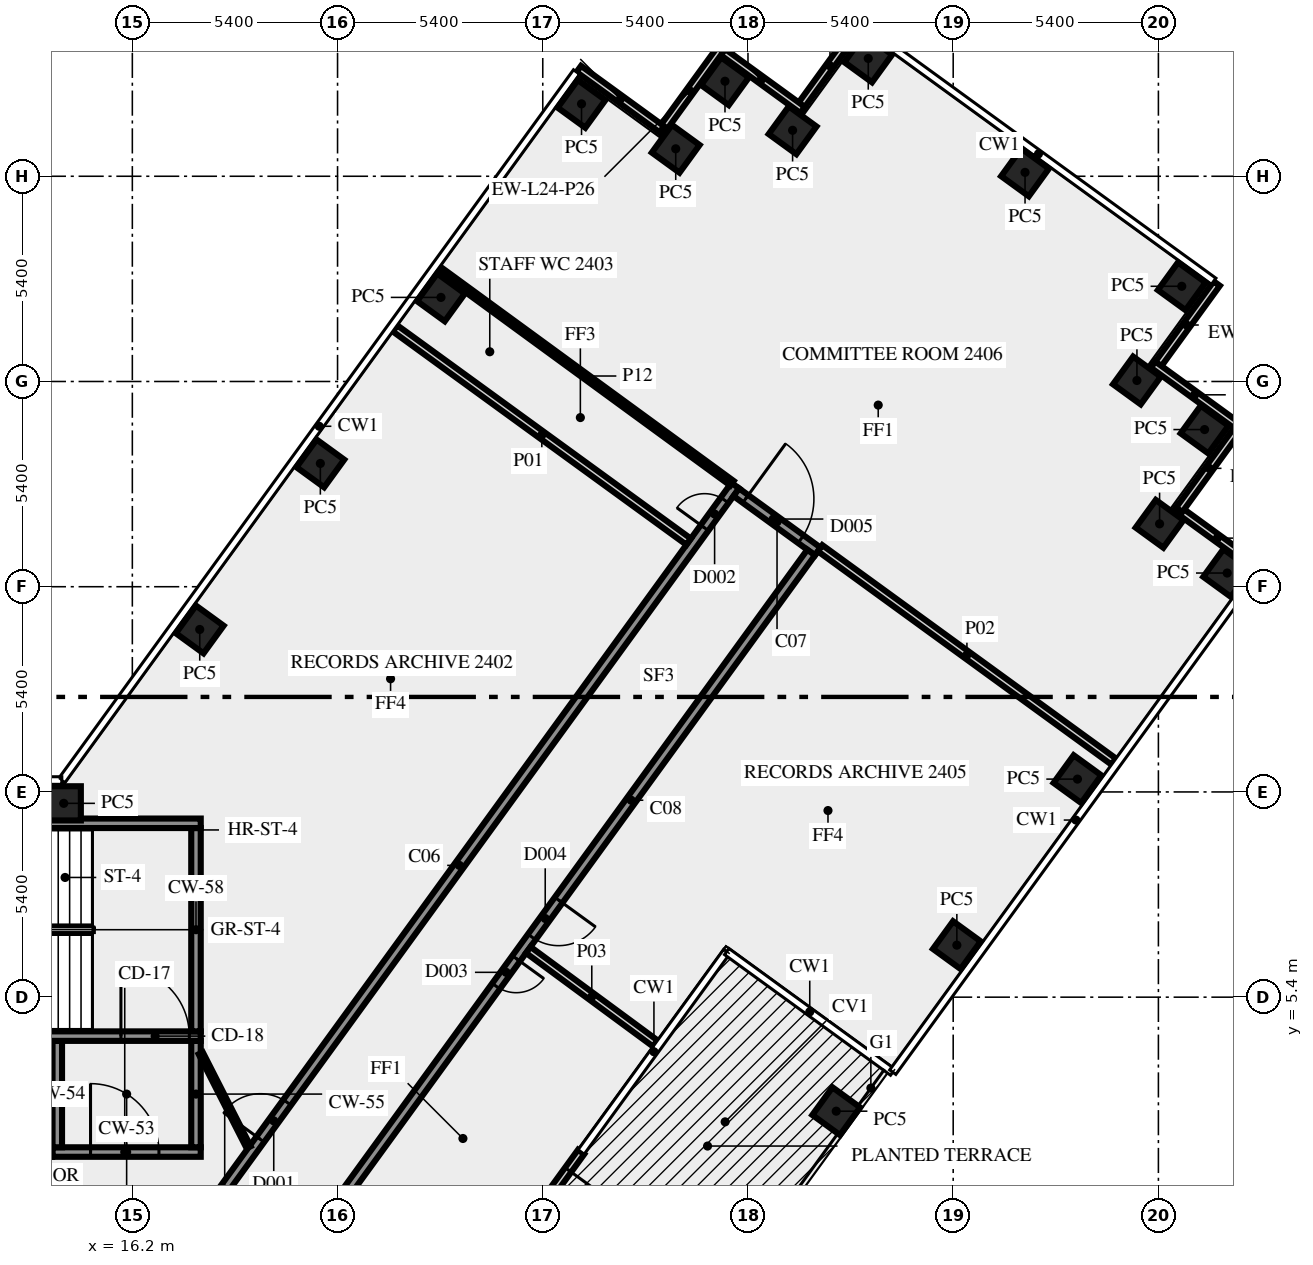
"""IFC4 building model, lengths in metres.
Left out: names, types, materials, properties, quantities, classifications, styles, units other than length and angle.
Written with IfcOpenShell. Run it as: python <this file> out.ifc"""

import sys

from ifc_helpers import new_model, si_unit, direction, frame, frame_2d, origin, origin_2d, place, context, subcontext, project, spatial, rectangle, extrude, element, fill, save


model = new_model("IFC4")
c1 = context("Model", 3, precision=1e-05, world=origin(), true_north=direction((0.0, 1.0)))
c2 = subcontext(c1, "Body", "Model", "MODEL_VIEW")
j1 = project(units=[si_unit("LENGTHUNIT", "METRE"), si_unit("PLANEANGLEUNIT", "RADIAN")], contexts=[c1])
p1 = place(None, origin())
s1 = spatial("IfcSite", under=j1, at=p1, CompositionType="ELEMENT")
p2 = place(p1, origin())
s2 = spatial("IfcBuilding", under=s1, at=p2, CompositionType="ELEMENT")
p3 = place(p2, frame((0.0, 0.0, 105.0)))
s3 = spatial("IfcBuildingStorey", under=s2, at=p3, CompositionType="ELEMENT", Elevation=105.0)
for number, where, z_axis, x_axis in (
    (1, (34.722, 2.4, 0.0), (0.0, 0.0, 1.0), (0.588, 0.809, 0.0)),
    (2, (37.896, 6.769, 0.0), (0.0, 0.0, 1.0), (0.588, 0.809, 0.0)),
    (3, (41.07, 11.137, 0.0), (0.0, 0.0, 1.0), (0.588, 0.809, 0.0)),
    (4, (45.01, 16.56, 0.0), (0.0, 0.0, 1.0), (0.588, 0.809, 0.0)),
    (5, (43.231, 17.854, 0.0), (0.0, 0.0, 1.0), (0.588, 0.809, 0.0)),
    (6, (44.415, 20.335, 0.0), (0.0, 0.0, 1.0), (0.588, 0.809, 0.0)),
    (7, (42.635, 21.626, 0.0), (0.0, 0.0, 1.0), (-0.809, 0.588, 0.0)),
    (8, (43.815, 24.105, 0.0), (0.0, 0.0, 1.0), (-0.809, 0.588, 0.0)),
    (9, (39.691, 27.102, 0.0), (0.0, 0.0, 1.0), (-0.809, 0.588, 0.0)),
    (10, (35.565, 30.1, 0.0), (0.0, 0.0, 1.0), (-0.588, -0.809, 0.0)),
    (11, (33.574, 28.209, 0.0), (0.0, 0.0, 1.0), (-0.809, 0.588, 0.0)),
    (12, (31.795, 29.5, 0.0), (0.0, 0.0, 1.0), (-0.588, -0.809, 0.0)),
    (13, (30.499, 27.723, 0.0), (0.0, 0.0, 1.0), (-0.809, 0.588, 0.0)),
    (14, (28.02, 28.905, 0.0), (0.0, 0.0, 1.0), (-0.809, 0.588, 0.0)),
    (15, (24.321, 23.812, 0.0), (0.0, 0.0, 1.0), (-0.588, -0.809, 0.0)),
    (16, (21.147, 19.444, 0.0), (0.0, 0.0, 1.0), (-0.588, -0.809, 0.0)),
    (17, (17.974, 15.075, 0.0), (0.0, 0.0, 1.0), (-0.588, -0.809, 0.0)),
    (18, (14.395, 10.5, 0.0), (0.0, 0.0, 1.0), (-1.0, 0.0, 0.0)),
):
    element("IfcColumn", number, at=place(p3, frame(where, z_axis=z_axis, x_axis=x_axis)), inside=s3, PredefinedType="COLUMN", context=c2, shape_type="SweptSolid", body=[
        extrude(rectangle(XDim=0.9, YDim=0.9, at=origin_2d()), origin(), (0.0, 0.0, 1.0), 3.65),
    ])
for number, where, z_axis, x_axis in (
    (19, (43.149, 21.994, 0.0), (0.0, 0.0, 1.0), (0.588, 0.809, 0.0)),
    (20, (35.351, 30.997, 0.0), (0.0, 0.0, 1.0), (-0.588, -0.809, 0.0)),
    (21, (33.838, 28.744, 0.0), (0.0, 0.0, 1.0), (-0.809, 0.588, 0.0)),
    (22, (31.67, 30.333, 0.0), (0.0, 0.0, 1.0), (-0.588, -0.809, 0.0)),
    (23, (30.133, 28.237, 0.0), (0.0, 0.0, 1.0), (-0.809, 0.588, 0.0)),
):
    element("IfcWall", number, at=place(p3, frame(where, z_axis=z_axis, x_axis=x_axis)), inside=s3, PredefinedType="SOLIDWALL", context=c2, shape_type="SweptSolid", body=[
        extrude(rectangle(XDim=2.7, YDim=0.2, at=frame_2d((1.35, 0.0))), origin(), (0.0, 0.0, 1.0), 3.65),
    ])
p4 = place(p3, frame((28.01, 1.327, 0.0), z_axis=(0.0, 0.0, 1.0), x_axis=(-0.587735577821, -0.809053082661, 0.0)))
e24 = element("IfcWall", 24, at=p4, inside=s3, PredefinedType="SOLIDWALL", context=c2, shape_type="SweptSolid", body=[
    extrude(rectangle(XDim=2.963, YDim=0.2, at=frame_2d((1.481, 0.0))), origin(), (0.0, 0.0, 1.0), 3.65),
])
p5 = place(p4, frame((0.582, 0.0, 0.0)))
e25 = element("IfcOpeningElement", 25, at=p5, cuts=e24, PredefinedType="OPENING", context=c2, shape_type="SweptSolid", body=[
    extrude(rectangle(XDim=1.8, YDim=2.4, at=frame_2d((0.9, 1.2))), frame((0.0, 0.11, 0.0), z_axis=(0.0, -1.0, 0.0), x_axis=(1.0, 0.0, 0.0)), (0.0, 0.0, 1.0), 0.22),
])
for number, where, z_axis, x_axis in (
    (26, (45.842, 16.685, 0.0), (0.0, 0.0, 1.0), (-0.809, 0.588, 0.0)),
    (27, (43.746, 18.223, 0.0), (0.0, 0.0, 1.0), (0.588, 0.809, 0.0)),
    (28, (45.245, 20.456, 0.0), (0.0, 0.0, 1.0), (-0.809, 0.588, 0.0)),
):
    element("IfcWall", number, at=place(p3, frame(where, z_axis=z_axis, x_axis=x_axis)), inside=s3, PredefinedType="SOLIDWALL", context=c2, shape_type="SweptSolid", body=[
        extrude(rectangle(XDim=2.7, YDim=0.2, at=frame_2d((1.35, 0.0))), origin(), (0.0, 0.0, 1.0), 3.65),
    ])
p6 = place(p3, frame((14.1, 1.325, 0.0), z_axis=(0.0, 0.0, 1.0), x_axis=(1.0, 0.0, 0.0)))
e29 = element("IfcWall", 29, at=p6, inside=s3, PredefinedType="SHEAR", context=c2, shape_type="SweptSolid", body=[
    extrude(rectangle(XDim=3.9, YDim=0.25, at=frame_2d((1.95, 0.0))), origin(), (0.0, 0.0, 1.0), 3.65),
])
p7 = place(p6, frame((1.0, 0.0, 0.0)))
e30 = element("IfcOpeningElement", 30, at=p7, cuts=e29, PredefinedType="OPENING", context=c2, shape_type="SweptSolid", body=[
    extrude(rectangle(XDim=1.8, YDim=2.1, at=frame_2d((0.9, 1.05))), frame((0.0, 0.135, 0.0), z_axis=(0.0, -1.0, 0.0), x_axis=(1.0, 0.0, 0.0)), (0.0, 0.0, 1.0), 0.27),
])
for number, where, z_axis, x_axis in (
    (31, (14.225, 1.45, 0.0), (0.0, 0.0, 1.0), (0.0, 1.0, 0.0)),
    (32, (17.875, 1.45, 0.0), (0.0, 0.0, 1.0), (0.0, 1.0, 0.0)),
):
    element("IfcWall", number, at=place(p3, frame(where, z_axis=z_axis, x_axis=x_axis)), inside=s3, PredefinedType="SHEAR", context=c2, shape_type="SweptSolid", body=[
        extrude(rectangle(XDim=2.8, YDim=0.25, at=frame_2d((1.4, 0.0))), origin(), (0.0, 0.0, 1.0), 3.65),
    ])
p8 = place(p3, frame((7.5, 4.375, 0.0), z_axis=(0.0, 0.0, 1.0), x_axis=(1.0, 0.0, 0.0)))
e33 = element("IfcWall", 33, at=p8, inside=s3, PredefinedType="SHEAR", context=c2, shape_type="SweptSolid", body=[
    extrude(rectangle(XDim=10.5, YDim=0.25, at=frame_2d((5.25, 0.0))), origin(), (0.0, 0.0, 1.0), 3.65),
])
p9 = place(p8, frame((8.4, 0.0, 0.0)))
e34 = element("IfcOpeningElement", 34, at=p9, cuts=e33, PredefinedType="OPENING", context=c2, shape_type="SweptSolid", body=[
    extrude(rectangle(XDim=1.8, YDim=2.1, at=frame_2d((0.9, 1.05))), frame((0.0, 0.135, 0.0), z_axis=(0.0, -1.0, 0.0), x_axis=(1.0, 0.0, 0.0)), (0.0, 0.0, 1.0), 0.27),
])
p10 = place(p3, frame((17.875, 4.5, 0.0), z_axis=(0.0, 0.0, 1.0), x_axis=(0.0, 1.0, 0.0)))
e35 = element("IfcWall", 35, at=p10, inside=s3, PredefinedType="SHEAR", context=c2, shape_type="SweptSolid", body=[
    extrude(rectangle(XDim=5.35, YDim=0.25, at=frame_2d((2.675, 0.0))), origin(), (0.0, 0.0, 1.0), 3.65),
])
p11 = place(p3, frame((7.5, 9.975, 0.0), z_axis=(0.0, 0.0, 1.0), x_axis=(1.0, 0.0, 0.0)))
e36 = element("IfcWall", 36, at=p11, inside=s3, PredefinedType="SHEAR", context=c2, shape_type="SweptSolid", body=[
    extrude(rectangle(XDim=10.5, YDim=0.25, at=frame_2d((5.25, 0.0))), origin(), (0.0, 0.0, 1.0), 3.65),
])
p12 = place(p11, frame((2.0, 0.0, 1.0)))
e37 = element("IfcOpeningElement", 37, at=p12, cuts=e36, PredefinedType="OPENING", context=c2, shape_type="SweptSolid", body=[
    extrude(rectangle(XDim=1.2, YDim=1.2, at=frame_2d((0.6, 0.6))), frame((0.0, 0.135, 0.0), z_axis=(0.0, -1.0, 0.0), x_axis=(1.0, 0.0, 0.0)), (0.0, 0.0, 1.0), 0.27),
])
p13 = place(p3, frame((17.545, -1.125, 0.0), z_axis=(0.0, 0.0, 1.0), x_axis=(0.587791430994, 0.80901250525, 0.0)))
e38 = element("IfcWall", 38, at=p13, inside=s3, PredefinedType="SOLIDWALL", context=c2, shape_type="SweptSolid", body=[
    extrude(rectangle(XDim=24.703, YDim=0.25, at=frame_2d((12.352, 0.0))), origin(), (0.0, 0.0, 1.0), 3.65),
])
p14 = place(p13, frame((3.442, 0.0, 0.0)))
e39 = element("IfcOpeningElement", 39, at=p14, cuts=e38, PredefinedType="OPENING", context=c2, shape_type="SweptSolid", body=[
    extrude(rectangle(XDim=1.2, YDim=2.1, at=frame_2d((0.6, 1.05))), frame((0.0, 0.135, 0.0), z_axis=(0.0, -1.0, 0.0), x_axis=(1.0, 0.0, 0.0)), (0.0, 0.0, 1.0), 0.27),
])
p15 = place(p13, frame((23.329, 0.0, 0.0)))
e40 = element("IfcOpeningElement", 40, at=p15, cuts=e38, PredefinedType="OPENING", context=c2, shape_type="SweptSolid", body=[
    extrude(rectangle(XDim=0.9, YDim=2.1, at=frame_2d((0.45, 1.05))), frame((0.0, 0.135, 0.0), z_axis=(0.0, -1.0, 0.0), x_axis=(1.0, 0.0, 0.0)), (0.0, 0.0, 1.0), 0.27),
])
p16 = place(p3, frame((32.093, 18.686, 0.0), z_axis=(0.0, 0.0, 1.0), x_axis=(0.809006914995, -0.587799125119, 0.0)))
e41 = element("IfcWall", 41, at=p16, inside=s3, PredefinedType="SOLIDWALL", context=c2, shape_type="SweptSolid", body=[
    extrude(rectangle(XDim=2.65, YDim=0.25, at=frame_2d((1.325, 0.0))), origin(), (0.0, 0.0, 1.0), 3.65),
])
p17 = place(p16, frame((0.3, 0.0, 0.0)))
e42 = element("IfcOpeningElement", 42, at=p17, cuts=e41, PredefinedType="OPENING", context=c2, shape_type="SweptSolid", body=[
    extrude(rectangle(XDim=1.8, YDim=2.1, at=frame_2d((0.9, 1.05))), frame((0.0, 0.135, 0.0), z_axis=(0.0, -1.0, 0.0), x_axis=(1.0, 0.0, 0.0)), (0.0, 0.0, 1.0), 0.27),
])
p18 = place(p3, frame((34.062, 17.101, 0.0), z_axis=(0.0, 0.0, 1.0), x_axis=(-0.58778129431, -0.809019870003, 0.0)))
e43 = element("IfcWall", 43, at=p18, inside=s3, PredefinedType="SOLIDWALL", context=c2, shape_type="SweptSolid", body=[
    extrude(rectangle(XDim=23.021, YDim=0.25, at=frame_2d((11.51, 0.0))), origin(), (0.0, 0.0, 1.0), 3.65),
])
p19 = place(p18, frame((11.304, 0.0, 0.0)))
e44 = element("IfcOpeningElement", 44, at=p19, cuts=e43, PredefinedType="OPENING", context=c2, shape_type="SweptSolid", body=[
    extrude(rectangle(XDim=1.2, YDim=2.1, at=frame_2d((0.6, 1.05))), frame((0.0, 0.135, 0.0), z_axis=(0.0, -1.0, 0.0), x_axis=(1.0, 0.0, 0.0)), (0.0, 0.0, 1.0), 0.27),
])
p20 = place(p18, frame((13.205, 0.0, 0.0)))
e45 = element("IfcOpeningElement", 45, at=p20, cuts=e43, PredefinedType="OPENING", context=c2, shape_type="SweptSolid", body=[
    extrude(rectangle(XDim=0.9, YDim=2.1, at=frame_2d((0.45, 1.05))), frame((0.0, 0.135, 0.0), z_axis=(0.0, -1.0, 0.0), x_axis=(1.0, 0.0, 0.0)), (0.0, 0.0, 1.0), 0.27),
])
p21 = place(p3, frame((30.838, 17.385, 0.0), z_axis=(0.0, 0.0, 1.0), x_axis=(-0.809043311713, 0.587749027879, 0.0)))
e46 = element("IfcWall", 46, at=p21, inside=s3, PredefinedType="SOLIDWALL", context=c2, shape_type="SweptSolid", body=[
    extrude(rectangle(XDim=9.55, YDim=0.2, at=frame_2d((4.775, 0.0))), origin(), (0.0, 0.0, 1.0), 2.75),
])
p22 = place(p3, frame((42.024, 11.599, 0.0), z_axis=(0.0, 0.0, 1.0), x_axis=(-0.80898585166, 0.587828114175, 0.0)))
e47 = element("IfcWall", 47, at=p22, inside=s3, PredefinedType="SOLIDWALL", context=c2, shape_type="SweptSolid", body=[
    extrude(rectangle(XDim=9.55, YDim=0.2, at=frame_2d((4.775, 0.0))), origin(), (0.0, 0.0, 1.0), 2.75),
])
p23 = place(p3, frame((26.619, 6.643, 0.0), z_axis=(0.0, 0.0, 1.0), x_axis=(0.805298264495, -0.592869888931, 0.0)))
e48 = element("IfcWall", 48, at=p23, inside=s3, PredefinedType="SOLIDWALL", context=c2, shape_type="SweptSolid", body=[
    extrude(rectangle(XDim=4.15, YDim=0.2, at=frame_2d((2.075, 0.0))), origin(), (0.0, 0.0, 1.0), 3.65),
])
p24 = place(p3, frame((24.251, 24.566, 0.0), z_axis=(0.0, 0.0, 1.0), x_axis=(0.807588329082, -0.589746632657, 0.0)))
e49 = element("IfcWall", 49, at=p24, inside=s3, PredefinedType="PARTITIONING", context=c2, shape_type="SweptSolid", body=[
    extrude(rectangle(XDim=9.57, YDim=0.15, at=frame_2d((4.785, 0.0))), origin(), (0.0, 0.0, 1.0), 2.75),
])
p25 = place(p3, frame((18.0, 3.925, 0.0), z_axis=(0.0, 0.0, 1.0), x_axis=(0.453950796792, -0.891026752736, 0.0)))
e50 = element("IfcWall", 50, at=p25, inside=s3, PredefinedType="PARTITIONING", context=c2, shape_type="SweptSolid", body=[
    extrude(rectangle(XDim=2.778, YDim=0.12, at=frame_2d((1.389, 0.0))), origin(), (0.0, 0.0, 1.0), 3.65),
])
p26 = place(p5, origin())
e51 = element("IfcDoor", 51, at=p26, inside=s3, OperationType="DOUBLE_DOOR_SINGLE_SWING", PredefinedType="DOOR", context=c2, shape_type="SweptSolid", body=[
    extrude(rectangle(XDim=1.8, YDim=2.4, at=frame_2d((0.9, 1.2))), frame((0.0, 0.025, 0.0), z_axis=(0.0, -1.0, 0.0), x_axis=(1.0, 0.0, 0.0)), (0.0, 0.0, 1.0), 0.05),
])
fill(e25, e51)
p27 = place(p7, origin())
e52 = element("IfcDoor", 52, at=p27, inside=s3, OperationType="DOUBLE_DOOR_SINGLE_SWING", PredefinedType="DOOR", context=c2, shape_type="SweptSolid", body=[
    extrude(rectangle(XDim=1.8, YDim=2.1, at=frame_2d((0.9, 1.05))), frame((0.0, 0.025, 0.0), z_axis=(0.0, -1.0, 0.0), x_axis=(1.0, 0.0, 0.0)), (0.0, 0.0, 1.0), 0.05),
])
fill(e30, e52)
p28 = place(p9, origin())
e53 = element("IfcDoor", 53, at=p28, inside=s3, OperationType="DOUBLE_DOOR_SINGLE_SWING", PredefinedType="DOOR", context=c2, shape_type="SweptSolid", body=[
    extrude(rectangle(XDim=1.8, YDim=2.1, at=frame_2d((0.9, 1.05))), frame((0.0, 0.025, 0.0), z_axis=(0.0, -1.0, 0.0), x_axis=(1.0, 0.0, 0.0)), (0.0, 0.0, 1.0), 0.05),
])
fill(e34, e53)
p29 = place(p14, origin())
e54 = element("IfcDoor", 54, at=p29, inside=s3, OperationType="SINGLE_SWING_LEFT", PredefinedType="DOOR", context=c2, shape_type="SweptSolid", body=[
    extrude(rectangle(XDim=1.2, YDim=2.1, at=frame_2d((0.6, 1.05))), frame((0.0, 0.025, 0.0), z_axis=(0.0, -1.0, 0.0), x_axis=(1.0, 0.0, 0.0)), (0.0, 0.0, 1.0), 0.05),
])
fill(e39, e54)
p30 = place(p19, origin())
e55 = element("IfcDoor", 55, at=p30, inside=s3, OperationType="SINGLE_SWING_RIGHT", PredefinedType="DOOR", context=c2, shape_type="SweptSolid", body=[
    extrude(rectangle(XDim=1.2, YDim=2.1, at=frame_2d((0.6, 1.05))), frame((0.0, 0.025, 0.0), z_axis=(0.0, -1.0, 0.0), x_axis=(1.0, 0.0, 0.0)), (0.0, 0.0, 1.0), 0.05),
])
fill(e44, e55)
p31 = place(p17, origin())
e56 = element("IfcDoor", 56, at=p31, inside=s3, OperationType="DOUBLE_DOOR_SINGLE_SWING", PredefinedType="DOOR", context=c2, shape_type="SweptSolid", body=[
    extrude(rectangle(XDim=1.8, YDim=2.1, at=frame_2d((0.9, 1.05))), frame((0.0, 0.025, 0.0), z_axis=(0.0, -1.0, 0.0), x_axis=(1.0, 0.0, 0.0)), (0.0, 0.0, 1.0), 0.05),
])
fill(e42, e56)
p32 = place(p20, origin())
e57 = element("IfcDoor", 57, at=p32, inside=s3, OperationType="SINGLE_SWING_LEFT", PredefinedType="DOOR", context=c2, shape_type="SweptSolid", body=[
    extrude(rectangle(XDim=0.9, YDim=2.1, at=frame_2d((0.45, 1.05))), frame((0.0, 0.025, 0.0), z_axis=(0.0, -1.0, 0.0), x_axis=(1.0, 0.0, 0.0)), (0.0, 0.0, 1.0), 0.05),
])
fill(e45, e57)
p33 = place(p15, origin())
e58 = element("IfcDoor", 58, at=p33, inside=s3, OperationType="SINGLE_SWING_RIGHT", PredefinedType="DOOR", context=c2, shape_type="SweptSolid", body=[
    extrude(rectangle(XDim=0.9, YDim=2.1, at=frame_2d((0.45, 1.05))), frame((0.0, 0.025, 0.0), z_axis=(0.0, -1.0, 0.0), x_axis=(1.0, 0.0, 0.0)), (0.0, 0.0, 1.0), 0.05),
])
fill(e40, e58)
save(model, sys.argv[1])
